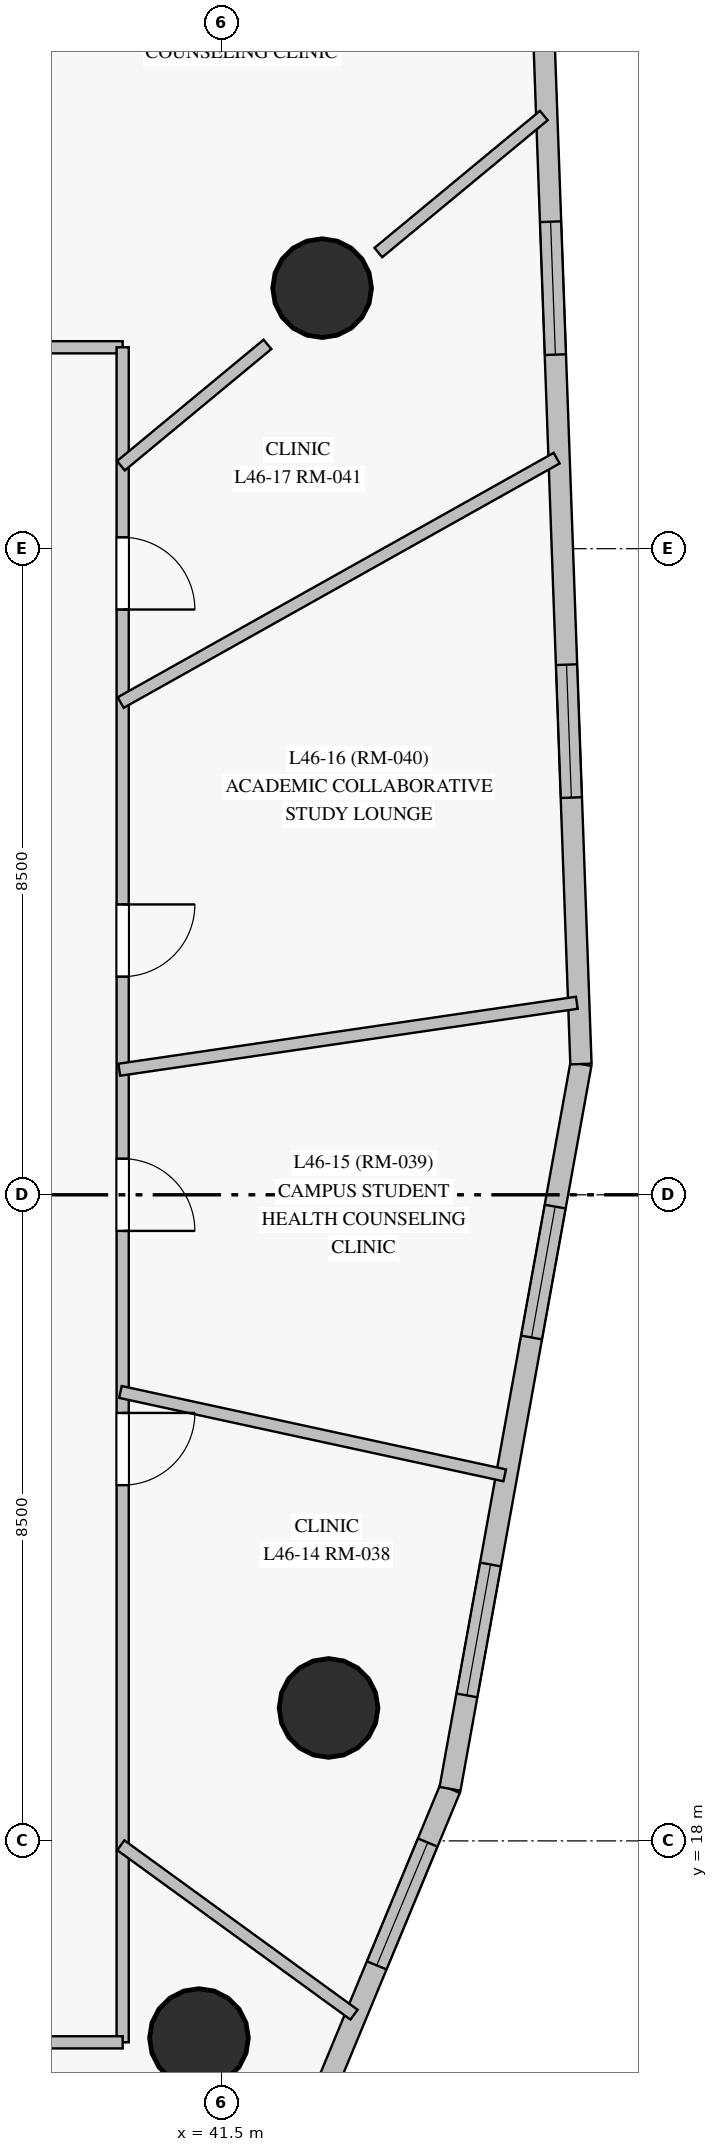
"""IFC4 building model, lengths in metres.
Left out: names, types, materials, properties, quantities, classifications, styles, units other than length and angle.
Written with IfcOpenShell. Run it as: python <this file> out.ifc"""

import sys

from ifc_helpers import new_model, si_unit, direction, frame, frame_2d, origin, origin_with_axes, origin_2d, place, context, subcontext, project, spatial, rectangle, circle, extrude, source, transform, mapped, element, fill, save


model = new_model("IFC4")
c1 = context("Model", 3, precision=1e-05, world=origin(), true_north=direction((0.0, 1.0)))
c2 = subcontext(c1, "Body", "Model", "MODEL_VIEW")
j1 = project(units=[si_unit("LENGTHUNIT", "METRE"), si_unit("PLANEANGLEUNIT", "RADIAN")], contexts=[c1])
p1 = place(None, origin())
s1 = spatial("IfcSite", under=j1, at=p1, CompositionType="ELEMENT")
p2 = place(p1, origin())
s2 = spatial("IfcBuilding", under=s1, at=p2, CompositionType="ELEMENT")
p3 = place(p2, frame((0.0, 0.0, 162.65)))
s3 = spatial("IfcBuildingStorey", under=s2, at=p3, CompositionType="ELEMENT", Elevation=162.65)
m1 = source(origin_with_axes(), c2, "Body", "SweptSolid", [
    extrude(circle(Radius=0.65, at=origin_2d()), origin(), (0.0, 0.0, 1.0), 3.05),
])
for number, where, z_axis, x_axis in (
    (1, (42.909, 19.749, 0.0), (0.0, 0.0, 1.0), (1.0, 0.0, 0.0)),
    (2, (42.824, 38.428, 0.0), (0.0, 0.0, 1.0), (1.0, 0.0, 0.0)),
    (3, (41.204, 15.406, 0.0), (0.0, 0.0, 1.0), (1.0, 0.0, 0.0)),
):
    element("IfcColumn", number, at=place(p3, frame(where, z_axis=z_axis, x_axis=x_axis)), inside=s3, PredefinedType="COLUMN", context=c2, shape_type="MappedRepresentation", body=[
        mapped(m1, transform((0.0, 0.0, 0.0), scale=1.0)),
    ])
p4 = place(p3, frame((39.155, 5.792, 0.0), z_axis=(0.0, 0.0, 1.0), x_axis=(0.383396812416, 0.92358371804, 0.0)))
e4 = element("IfcWall", 4, at=p4, inside=s3, PredefinedType="SOLIDWALL", context=c2, shape_type="SweptSolid", body=[
    extrude(rectangle(XDim=13.959, YDim=0.28, at=frame_2d((6.98, 0.0))), origin(), (0.0, 0.0, 1.0), 2.825),
])
p5 = place(p4, frame((0.606, 0.0, 0.85)))
e5 = element("IfcOpeningElement", 5, at=p5, cuts=e4, PredefinedType="OPENING", context=c2, shape_type="SweptSolid", body=[
    extrude(rectangle(XDim=1.75, YDim=1.65, at=frame_2d((0.875, 0.825))), frame((0.0, 0.15, 0.0), z_axis=(0.0, -1.0, 0.0), x_axis=(1.0, 0.0, 0.0)), (0.0, 0.0, 1.0), 0.3),
])
p6 = place(p4, frame((4.146, 0.0, 0.85)))
e6 = element("IfcOpeningElement", 6, at=p6, cuts=e4, PredefinedType="OPENING", context=c2, shape_type="SweptSolid", body=[
    extrude(rectangle(XDim=1.75, YDim=1.65, at=frame_2d((0.875, 0.825))), frame((0.0, 0.15, 0.0), z_axis=(0.0, -1.0, 0.0), x_axis=(1.0, 0.0, 0.0)), (0.0, 0.0, 1.0), 0.3),
])
p7 = place(p4, frame((7.745, 0.0, 0.85)))
e7 = element("IfcOpeningElement", 7, at=p7, cuts=e4, PredefinedType="OPENING", context=c2, shape_type="SweptSolid", body=[
    extrude(rectangle(XDim=1.75, YDim=1.65, at=frame_2d((0.875, 0.825))), frame((0.0, 0.15, 0.0), z_axis=(0.0, -1.0, 0.0), x_axis=(1.0, 0.0, 0.0)), (0.0, 0.0, 1.0), 0.3),
])
p8 = place(p4, frame((11.444, 0.0, 0.85)))
e8 = element("IfcOpeningElement", 8, at=p8, cuts=e4, PredefinedType="OPENING", context=c2, shape_type="SweptSolid", body=[
    extrude(rectangle(XDim=1.75, YDim=1.65, at=frame_2d((0.875, 0.825))), frame((0.0, 0.15, 0.0), z_axis=(0.0, -1.0, 0.0), x_axis=(1.0, 0.0, 0.0)), (0.0, 0.0, 1.0), 0.3),
])
p9 = place(p3, frame((44.507, 18.685, 0.0), z_axis=(0.0, 0.0, 1.0), x_axis=(0.177789963773, 0.984068457365, 0.0)))
e9 = element("IfcWall", 9, at=p9, inside=s3, PredefinedType="SOLIDWALL", context=c2, shape_type="SweptSolid", body=[
    extrude(rectangle(XDim=9.689, YDim=0.28, at=frame_2d((4.845, 0.0))), origin(), (0.0, 0.0, 1.0), 2.825),
])
p10 = place(p9, frame((1.249, 0.0, 0.85)))
e10 = element("IfcOpeningElement", 10, at=p10, cuts=e9, PredefinedType="OPENING", context=c2, shape_type="SweptSolid", body=[
    extrude(rectangle(XDim=1.75, YDim=1.65, at=frame_2d((0.875, 0.825))), frame((0.0, 0.15, 0.0), z_axis=(0.0, -1.0, 0.0), x_axis=(1.0, 0.0, 0.0)), (0.0, 0.0, 1.0), 0.3),
])
p11 = place(p9, frame((6.033, 0.0, 0.85)))
e11 = element("IfcOpeningElement", 11, at=p11, cuts=e9, PredefinedType="OPENING", context=c2, shape_type="SweptSolid", body=[
    extrude(rectangle(XDim=1.75, YDim=1.65, at=frame_2d((0.875, 0.825))), frame((0.0, 0.15, 0.0), z_axis=(0.0, -1.0, 0.0), x_axis=(1.0, 0.0, 0.0)), (0.0, 0.0, 1.0), 0.3),
])
p12 = place(p3, frame((46.229, 28.22, 0.0), z_axis=(0.0, 0.0, 1.0), x_axis=(-0.036027137179, 0.999350811971, 0.0)))
e12 = element("IfcWall", 12, at=p12, inside=s3, PredefinedType="SOLIDWALL", context=c2, shape_type="SweptSolid", body=[
    extrude(rectangle(XDim=13.96, YDim=0.28, at=frame_2d((6.98, 0.0))), origin(), (0.0, 0.0, 1.0), 2.825),
])
p13 = place(p12, frame((3.507, 0.0, 0.85)))
e13 = element("IfcOpeningElement", 13, at=p13, cuts=e12, PredefinedType="OPENING", context=c2, shape_type="SweptSolid", body=[
    extrude(rectangle(XDim=1.75, YDim=1.65, at=frame_2d((0.875, 0.825))), frame((0.0, 0.15, 0.0), z_axis=(0.0, -1.0, 0.0), x_axis=(1.0, 0.0, 0.0)), (0.0, 0.0, 1.0), 0.3),
])
p14 = place(p12, frame((9.339, 0.0, 0.85)))
e14 = element("IfcOpeningElement", 14, at=p14, cuts=e12, PredefinedType="OPENING", context=c2, shape_type="SweptSolid", body=[
    extrude(rectangle(XDim=1.75, YDim=1.65, at=frame_2d((0.875, 0.825))), frame((0.0, 0.15, 0.0), z_axis=(0.0, -1.0, 0.0), x_axis=(1.0, 0.0, 0.0)), (0.0, 0.0, 1.0), 0.3),
])
p15 = place(p3, frame((16.7, 37.65, 0.0), z_axis=(0.0, 0.0, 1.0), x_axis=(1.0, 0.0, 0.0)))
e15 = element("IfcWall", 15, at=p15, inside=s3, PredefinedType="PARTITIONING", context=c2, shape_type="SweptSolid", body=[
    extrude(rectangle(XDim=23.5, YDim=0.16, at=frame_2d((11.75, 0.0))), origin(), (0.0, 0.0, 1.0), 2.375),
])
p16 = place(p15, frame((20.87, 0.0, 0.0)))
e16 = element("IfcOpeningElement", 16, at=p16, cuts=e15, PredefinedType="OPENING", context=c2, shape_type="SweptSolid", body=[
    extrude(rectangle(XDim=0.95, YDim=2.15, at=frame_2d((0.475, 1.075))), frame((0.0, 0.09, 0.0), z_axis=(0.0, -1.0, 0.0), x_axis=(1.0, 0.0, 0.0)), (0.0, 0.0, 1.0), 0.18),
])
p17 = place(p15, frame((17.74, 0.0, 0.0)))
e17 = element("IfcOpeningElement", 17, at=p17, cuts=e15, PredefinedType="OPENING", context=c2, shape_type="SweptSolid", body=[
    extrude(rectangle(XDim=0.95, YDim=2.15, at=frame_2d((0.475, 1.075))), frame((0.0, 0.09, 0.0), z_axis=(0.0, -1.0, 0.0), x_axis=(1.0, 0.0, 0.0)), (0.0, 0.0, 1.0), 0.18),
])
p18 = place(p15, frame((15.44, 0.0, 0.0)))
e18 = element("IfcOpeningElement", 18, at=p18, cuts=e15, PredefinedType="OPENING", context=c2, shape_type="SweptSolid", body=[
    extrude(rectangle(XDim=0.95, YDim=2.15, at=frame_2d((0.475, 1.075))), frame((0.0, 0.09, 0.0), z_axis=(0.0, -1.0, 0.0), x_axis=(1.0, 0.0, 0.0)), (0.0, 0.0, 1.0), 0.18),
])
p19 = place(p15, frame((13.568, 0.0, 0.0)))
e19 = element("IfcOpeningElement", 19, at=p19, cuts=e15, PredefinedType="OPENING", context=c2, shape_type="SweptSolid", body=[
    extrude(rectangle(XDim=0.95, YDim=2.15, at=frame_2d((0.475, 1.075))), frame((0.0, 0.09, 0.0), z_axis=(0.0, -1.0, 0.0), x_axis=(1.0, 0.0, 0.0)), (0.0, 0.0, 1.0), 0.18),
])
p20 = place(p15, frame((11.365, 0.0, 0.0)))
e20 = element("IfcOpeningElement", 20, at=p20, cuts=e15, PredefinedType="OPENING", context=c2, shape_type="SweptSolid", body=[
    extrude(rectangle(XDim=0.95, YDim=2.15, at=frame_2d((0.475, 1.075))), frame((0.0, 0.09, 0.0), z_axis=(0.0, -1.0, 0.0), x_axis=(1.0, 0.0, 0.0)), (0.0, 0.0, 1.0), 0.18),
])
p21 = place(p15, frame((9.159, 0.0, 0.0)))
e21 = element("IfcOpeningElement", 21, at=p21, cuts=e15, PredefinedType="OPENING", context=c2, shape_type="SweptSolid", body=[
    extrude(rectangle(XDim=0.95, YDim=2.15, at=frame_2d((0.475, 1.075))), frame((0.0, 0.09, 0.0), z_axis=(0.0, -1.0, 0.0), x_axis=(1.0, 0.0, 0.0)), (0.0, 0.0, 1.0), 0.18),
])
p22 = place(p15, frame((5.89, 0.0, 0.0)))
e22 = element("IfcOpeningElement", 22, at=p22, cuts=e15, PredefinedType="OPENING", context=c2, shape_type="SweptSolid", body=[
    extrude(rectangle(XDim=0.95, YDim=2.15, at=frame_2d((0.475, 1.075))), frame((0.0, 0.09, 0.0), z_axis=(0.0, -1.0, 0.0), x_axis=(1.0, 0.0, 0.0)), (0.0, 0.0, 1.0), 0.18),
])
p23 = place(p15, frame((3.698, 0.0, 0.0)))
e23 = element("IfcOpeningElement", 23, at=p23, cuts=e15, PredefinedType="OPENING", context=c2, shape_type="SweptSolid", body=[
    extrude(rectangle(XDim=0.95, YDim=2.15, at=frame_2d((0.475, 1.075))), frame((0.0, 0.09, 0.0), z_axis=(0.0, -1.0, 0.0), x_axis=(1.0, 0.0, 0.0)), (0.0, 0.0, 1.0), 0.18),
])
p24 = place(p15, frame((1.277, 0.0, 0.0)))
e24 = element("IfcOpeningElement", 24, at=p24, cuts=e15, PredefinedType="OPENING", context=c2, shape_type="SweptSolid", body=[
    extrude(rectangle(XDim=0.86, YDim=2.04, at=frame_2d((0.43, 1.02))), frame((0.0, 0.09, 0.0), z_axis=(0.0, -1.0, 0.0), x_axis=(1.0, 0.0, 0.0)), (0.0, 0.0, 1.0), 0.18),
])
p25 = place(p3, frame((40.2, 37.65, 0.0), z_axis=(0.0, 0.0, 1.0), x_axis=(0.0, -1.0, 0.0)))
e25 = element("IfcWall", 25, at=p25, inside=s3, PredefinedType="PARTITIONING", context=c2, shape_type="SweptSolid", body=[
    extrude(rectangle(XDim=22.3, YDim=0.16, at=frame_2d((11.15, 0.0))), origin(), (0.0, 0.0, 1.0), 2.375),
])
p26 = place(p25, frame((14.02, 0.0, 0.0)))
e26 = element("IfcOpeningElement", 26, at=p26, cuts=e25, PredefinedType="OPENING", context=c2, shape_type="SweptSolid", body=[
    extrude(rectangle(XDim=0.95, YDim=2.15, at=frame_2d((0.475, 1.075))), frame((0.0, 0.09, 0.0), z_axis=(0.0, -1.0, 0.0), x_axis=(1.0, 0.0, 0.0)), (0.0, 0.0, 1.0), 0.18),
])
p27 = place(p25, frame((10.675, 0.0, 0.0)))
e27 = element("IfcOpeningElement", 27, at=p27, cuts=e25, PredefinedType="OPENING", context=c2, shape_type="SweptSolid", body=[
    extrude(rectangle(XDim=0.95, YDim=2.15, at=frame_2d((0.475, 1.075))), frame((0.0, 0.09, 0.0), z_axis=(0.0, -1.0, 0.0), x_axis=(1.0, 0.0, 0.0)), (0.0, 0.0, 1.0), 0.18),
])
p28 = place(p25, frame((7.33, 0.0, 0.0)))
e28 = element("IfcOpeningElement", 28, at=p28, cuts=e25, PredefinedType="OPENING", context=c2, shape_type="SweptSolid", body=[
    extrude(rectangle(XDim=0.95, YDim=2.15, at=frame_2d((0.475, 1.075))), frame((0.0, 0.09, 0.0), z_axis=(0.0, -1.0, 0.0), x_axis=(1.0, 0.0, 0.0)), (0.0, 0.0, 1.0), 0.18),
])
p29 = place(p25, frame((2.5, 0.0, 0.0)))
e29 = element("IfcOpeningElement", 29, at=p29, cuts=e25, PredefinedType="OPENING", context=c2, shape_type="SweptSolid", body=[
    extrude(rectangle(XDim=0.95, YDim=2.15, at=frame_2d((0.475, 1.075))), frame((0.0, 0.09, 0.0), z_axis=(0.0, -1.0, 0.0), x_axis=(1.0, 0.0, 0.0)), (0.0, 0.0, 1.0), 0.18),
])
p30 = place(p3, frame((33.95, 37.61, 0.0), z_axis=(0.0, 0.0, 1.0), x_axis=(0.436077675218, 0.899909029389, 0.0)))
e30 = element("IfcWall", 30, at=p30, inside=s3, PredefinedType="PARTITIONING", context=c2, shape_type="SweptSolid", body=[
    extrude(rectangle(XDim=12.175, YDim=0.16, at=frame_2d((6.087, 0.0))), origin(), (0.0, 0.0, 1.0), 2.825),
])
p31 = place(p3, frame((40.2, 15.35, 0.0), z_axis=(0.0, 0.0, 1.0), x_axis=(-1.0, 0.0, 0.0)))
e31 = element("IfcWall", 31, at=p31, inside=s3, PredefinedType="PARTITIONING", context=c2, shape_type="SweptSolid", body=[
    extrude(rectangle(XDim=10.65, YDim=0.16, at=frame_2d((5.325, 0.0))), origin(), (0.0, 0.0, 1.0), 2.275),
])
p32 = place(p31, frame((7.802, 0.0, 0.0)))
e32 = element("IfcOpeningElement", 32, at=p32, cuts=e31, PredefinedType="OPENING", context=c2, shape_type="SweptSolid", body=[
    extrude(rectangle(XDim=0.95, YDim=2.15, at=frame_2d((0.475, 1.075))), frame((0.0, 0.09, 0.0), z_axis=(0.0, -1.0, 0.0), x_axis=(1.0, 0.0, 0.0)), (0.0, 0.0, 1.0), 0.18),
])
p33 = place(p31, frame((5.058, 0.0, 0.0)))
e33 = element("IfcOpeningElement", 33, at=p33, cuts=e31, PredefinedType="OPENING", context=c2, shape_type="SweptSolid", body=[
    extrude(rectangle(XDim=0.95, YDim=2.15, at=frame_2d((0.475, 1.075))), frame((0.0, 0.09, 0.0), z_axis=(0.0, -1.0, 0.0), x_axis=(1.0, 0.0, 0.0)), (0.0, 0.0, 1.0), 0.18),
])
p34 = place(p31, frame((2.91, 0.0, 0.0)))
e34 = element("IfcOpeningElement", 34, at=p34, cuts=e31, PredefinedType="OPENING", context=c2, shape_type="SweptSolid", body=[
    extrude(rectangle(XDim=0.95, YDim=2.15, at=frame_2d((0.475, 1.075))), frame((0.0, 0.09, 0.0), z_axis=(0.0, -1.0, 0.0), x_axis=(1.0, 0.0, 0.0)), (0.0, 0.0, 1.0), 0.18),
])
p35 = place(p31, frame((1.812, 0.0, 0.0)))
e35 = element("IfcOpeningElement", 35, at=p35, cuts=e31, PredefinedType="OPENING", context=c2, shape_type="SweptSolid", body=[
    extrude(rectangle(XDim=0.95, YDim=2.15, at=frame_2d((0.475, 1.075))), frame((0.0, 0.09, 0.0), z_axis=(0.0, -1.0, 0.0), x_axis=(1.0, 0.0, 0.0)), (0.0, 0.0, 1.0), 0.18),
])
p36 = place(p3, frame((35.742, 37.625, 0.0), z_axis=(0.0, 0.0, 1.0), x_axis=(0.541788474869, 0.840514871076, 0.0)))
e36 = element("IfcWall", 36, at=p36, inside=s3, PredefinedType="PARTITIONING", context=c2, shape_type="SweptSolid", body=[
    extrude(rectangle(XDim=10.469, YDim=0.16, at=frame_2d((5.235, 0.0))), origin(), (0.0, 0.0, 1.0), 2.825),
])
p37 = place(p3, frame((35.707, 15.375, 0.0), z_axis=(0.0, 0.0, 1.0), x_axis=(0.547512330947, -0.836797614397, 0.0)))
e37 = element("IfcWall", 37, at=p37, inside=s3, PredefinedType="PARTITIONING", context=c2, shape_type="SweptSolid", body=[
    extrude(rectangle(XDim=8.254, YDim=0.16, at=frame_2d((4.127, 0.0))), origin(), (0.0, 0.0, 1.0), 2.825),
])
p38 = place(p3, frame((40.174, 32.976, 0.0), z_axis=(0.0, 0.0, 1.0), x_axis=(0.872278632977, 0.489009188514, 0.0)))
e38 = element("IfcWall", 38, at=p38, inside=s3, PredefinedType="PARTITIONING", context=c2, shape_type="SweptSolid", body=[
    extrude(rectangle(XDim=6.576, YDim=0.16, at=frame_2d((3.288, 0.0))), origin(), (0.0, 0.0, 1.0), 2.825),
])
p39 = place(p3, frame((40.156, 28.145, 0.0), z_axis=(0.0, 0.0, 1.0), x_axis=(0.989455594064, 0.144836554004, 0.0)))
e39 = element("IfcWall", 39, at=p39, inside=s3, PredefinedType="PARTITIONING", context=c2, shape_type="SweptSolid", body=[
    extrude(rectangle(XDim=6.083, YDim=0.16, at=frame_2d((3.042, 0.0))), origin(), (0.0, 0.0, 1.0), 2.825),
])
p40 = place(p3, frame((40.171, 23.906, 0.0), z_axis=(0.0, 0.0, 1.0), x_axis=(0.977261895477, -0.212035816901, 0.0)))
e40 = element("IfcWall", 40, at=p40, inside=s3, PredefinedType="PARTITIONING", context=c2, shape_type="SweptSolid", body=[
    extrude(rectangle(XDim=5.173, YDim=0.16, at=frame_2d((2.587, 0.0))), origin(), (0.0, 0.0, 1.0), 2.825),
])
p41 = place(p3, frame((40.176, 17.943, 0.0), z_axis=(0.0, 0.0, 1.0), x_axis=(0.809022702955, -0.587777395026, 0.0)))
e41 = element("IfcWall", 41, at=p41, inside=s3, PredefinedType="PARTITIONING", context=c2, shape_type="SweptSolid", body=[
    extrude(rectangle(XDim=3.793, YDim=0.16, at=frame_2d((1.896, 0.0))), origin(), (0.0, 0.0, 1.0), 2.825),
])
p42 = place(p3, frame((43.564, 38.896, 0.0), z_axis=(0.0, 0.0, 1.0), x_axis=(0.770214325441, 0.637785146336, 0.0)))
e42 = element("IfcWall", 42, at=p42, inside=s3, PredefinedType="PARTITIONING", context=c2, shape_type="SweptSolid", body=[
    extrude(rectangle(XDim=2.826, YDim=0.16, at=frame_2d((1.413, 0.0))), origin(), (0.0, 0.0, 1.0), 2.825),
])
p43 = place(p3, frame((40.177, 36.091, 0.0), z_axis=(0.0, 0.0, 1.0), x_axis=(0.77021590508, 0.637783238696, 0.0)))
e43 = element("IfcWall", 43, at=p43, inside=s3, PredefinedType="PARTITIONING", context=c2, shape_type="SweptSolid", body=[
    extrude(rectangle(XDim=2.503, YDim=0.16, at=frame_2d((1.252, 0.0))), origin(), (0.0, 0.0, 1.0), 2.275),
])
m2 = source(origin_with_axes(), c2, "Body", "SweptSolid", [
    extrude(rectangle(XDim=1.75, YDim=1.65, at=frame_2d((0.875, 0.825))), frame((0.0, 0.03, 0.0), z_axis=(0.0, -1.0, 0.0), x_axis=(1.0, 0.0, 0.0)), (0.0, 0.0, 1.0), 0.06),
])
p44 = place(p8, origin())
e44 = element("IfcWindow", 44, at=p44, inside=s3, PartitioningType="SINGLE_PANEL", PredefinedType="WINDOW", context=c2, shape_type="MappedRepresentation", body=[
    mapped(m2, transform((0.0, 0.0, 0.0), scale=1.0)),
])
fill(e8, e44)
p45 = place(p10, origin())
e45 = element("IfcWindow", 45, at=p45, inside=s3, PartitioningType="SINGLE_PANEL", PredefinedType="WINDOW", context=c2, shape_type="MappedRepresentation", body=[
    mapped(m2, transform((0.0, 0.0, 0.0), scale=1.0)),
])
fill(e10, e45)
p46 = place(p11, origin())
e46 = element("IfcWindow", 46, at=p46, inside=s3, PartitioningType="SINGLE_PANEL", PredefinedType="WINDOW", context=c2, shape_type="MappedRepresentation", body=[
    mapped(m2, transform((0.0, 0.0, 0.0), scale=1.0)),
])
fill(e11, e46)
p47 = place(p13, origin())
e47 = element("IfcWindow", 47, at=p47, inside=s3, PartitioningType="SINGLE_PANEL", PredefinedType="WINDOW", context=c2, shape_type="MappedRepresentation", body=[
    mapped(m2, transform((0.0, 0.0, 0.0), scale=1.0)),
])
fill(e13, e47)
p48 = place(p14, origin())
e48 = element("IfcWindow", 48, at=p48, inside=s3, PartitioningType="SINGLE_PANEL", PredefinedType="WINDOW", context=c2, shape_type="MappedRepresentation", body=[
    mapped(m2, transform((0.0, 0.0, 0.0), scale=1.0)),
])
fill(e14, e48)
m3 = source(origin_with_axes(), c2, "Body", "SweptSolid", [
    extrude(rectangle(XDim=0.95, YDim=2.15, at=frame_2d((0.475, 1.075))), frame((0.0, 0.025, 0.0), z_axis=(0.0, -1.0, 0.0), x_axis=(1.0, 0.0, 0.0)), (0.0, 0.0, 1.0), 0.05),
])
p49 = place(p26, origin())
e49 = element("IfcDoor", 49, at=p49, inside=s3, OperationType="SINGLE_SWING_LEFT", PredefinedType="DOOR", context=c2, shape_type="MappedRepresentation", body=[
    mapped(m3, transform((0.0, 0.0, 0.0), scale=1.0)),
])
fill(e26, e49)
p50 = place(p27, origin())
e50 = element("IfcDoor", 50, at=p50, inside=s3, OperationType="SINGLE_SWING_RIGHT", PredefinedType="DOOR", context=c2, shape_type="MappedRepresentation", body=[
    mapped(m3, transform((0.0, 0.0, 0.0), scale=1.0)),
])
fill(e27, e50)
p51 = place(p28, origin())
e51 = element("IfcDoor", 51, at=p51, inside=s3, OperationType="SINGLE_SWING_LEFT", PredefinedType="DOOR", context=c2, shape_type="MappedRepresentation", body=[
    mapped(m3, transform((0.0, 0.0, 0.0), scale=1.0)),
])
fill(e28, e51)
p52 = place(p29, origin())
e52 = element("IfcDoor", 52, at=p52, inside=s3, OperationType="SINGLE_SWING_RIGHT", PredefinedType="DOOR", context=c2, shape_type="MappedRepresentation", body=[
    mapped(m3, transform((0.0, 0.0, 0.0), scale=1.0)),
])
fill(e29, e52)
save(model, sys.argv[1])
